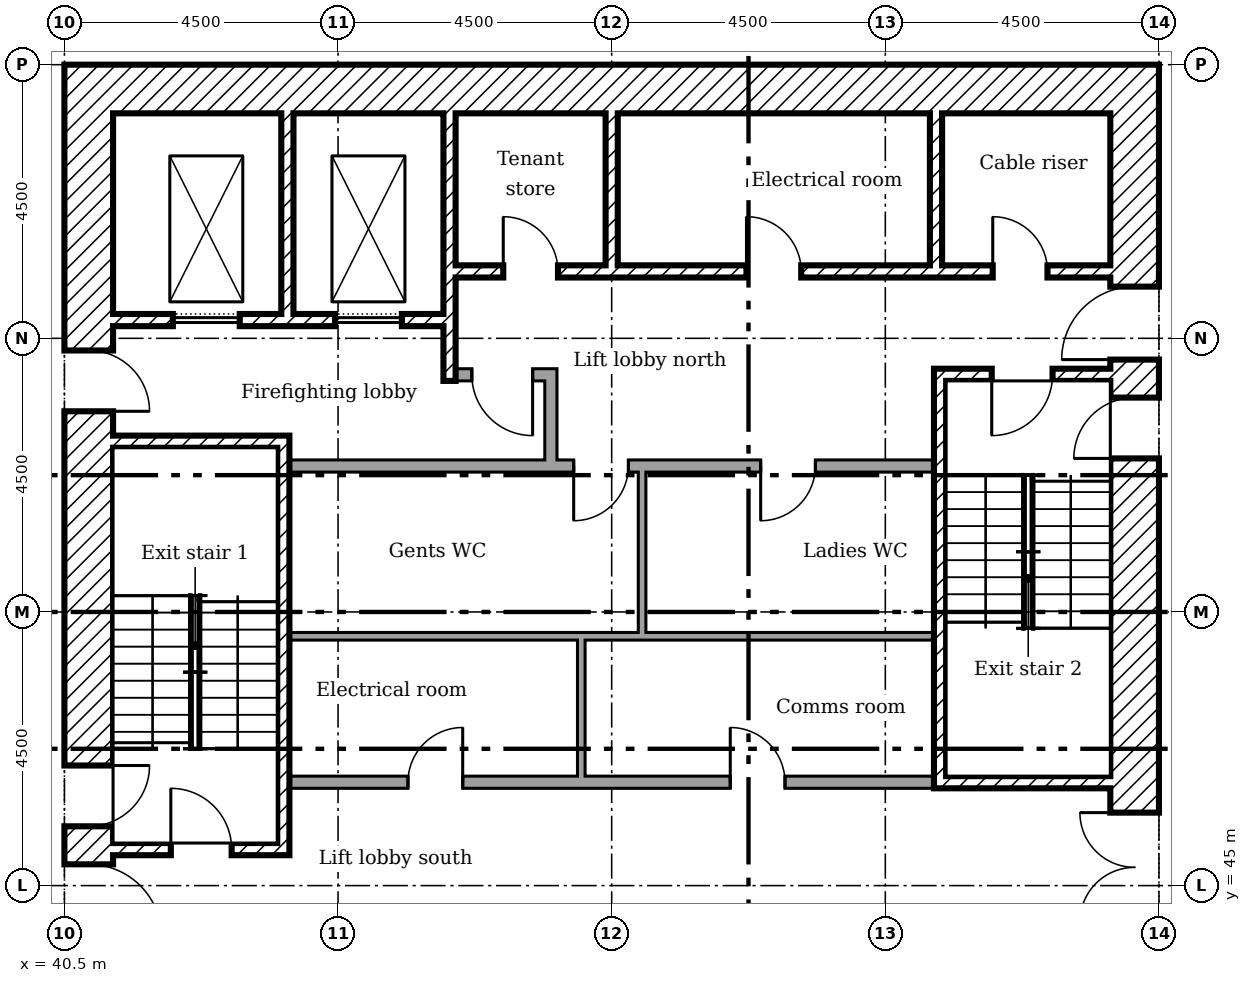
"""IFC4 building model, lengths in metres.
Left out: names, types, materials, properties, quantities, classifications, styles, units other than length and angle.
Written with IfcOpenShell. Run it as: python <this file> out.ifc"""

import sys

from ifc_helpers import new_model, si_unit, direction, frame, frame_2d, origin, place, context, subcontext, project, spatial, rectangle, extrude, element, fill, save


model = new_model("IFC4")
c1 = context("Model", 3, precision=1e-05, world=origin(), true_north=direction((0.0, 1.0)))
c2 = subcontext(c1, "Body", "Model", "MODEL_VIEW")
j1 = project(units=[si_unit("LENGTHUNIT", "METRE"), si_unit("PLANEANGLEUNIT", "RADIAN")], contexts=[c1])
p1 = place(None, origin())
s1 = spatial("IfcSite", under=j1, at=p1, CompositionType="ELEMENT")
p2 = place(p1, origin())
s2 = spatial("IfcBuilding", under=s1, at=p2, CompositionType="ELEMENT")
p3 = place(p2, frame((0.0, 0.0, 87.0)))
s3 = spatial("IfcBuildingStorey", under=s2, at=p3, CompositionType="ELEMENT", Elevation=87.0)
p4 = place(p3, frame((58.1, 40.5, 0.0), z_axis=(0.0, 0.0, 1.0), x_axis=(0.0, 1.0, 0.0)))
e1 = element("IfcWall", 1, at=p4, inside=s3, PredefinedType="SHEAR", context=c2, shape_type="SweptSolid", body=[
    extrude(rectangle(XDim=18.0, YDim=0.8, at=frame_2d((9.0, 0.0))), origin(), (0.0, 0.0, 1.0), 4.75),
])
p5 = place(p4, frame((13.15, 0.0, 0.0)))
e2 = element("IfcOpeningElement", 2, at=p5, cuts=e1, PredefinedType="OPENING", context=c2, shape_type="SweptSolid", body=[
    extrude(rectangle(XDim=1.2, YDim=2.1, at=frame_2d((0.6, 1.05))), frame((0.0, 0.41, 0.0), z_axis=(0.0, -1.0, 0.0), x_axis=(1.0, 0.0, 0.0)), (0.0, 0.0, 1.0), 0.82),
])
p6 = place(p4, frame((3.9, 0.0, 0.0)))
e3 = element("IfcOpeningElement", 3, at=p6, cuts=e1, PredefinedType="OPENING", context=c2, shape_type="SweptSolid", body=[
    extrude(rectangle(XDim=1.8, YDim=2.1, at=frame_2d((0.9, 1.05))), frame((0.0, 0.41, 0.0), z_axis=(0.0, -1.0, 0.0), x_axis=(1.0, 0.0, 0.0)), (0.0, 0.0, 1.0), 0.82),
])
p7 = place(p4, frame((11.525, 0.0, 0.0)))
e4 = element("IfcOpeningElement", 4, at=p7, cuts=e1, PredefinedType="OPENING", context=c2, shape_type="SweptSolid", body=[
    extrude(rectangle(XDim=1.0, YDim=2.1, at=frame_2d((0.5, 1.05))), frame((0.0, 0.41, 0.0), z_axis=(0.0, -1.0, 0.0), x_axis=(1.0, 0.0, 0.0)), (0.0, 0.0, 1.0), 0.82),
])
p8 = place(p3, frame((41.3, 58.1, 0.0)))
e5 = element("IfcWall", 5, at=p8, inside=s3, PredefinedType="SHEAR", context=c2, shape_type="SweptSolid", body=[
    extrude(rectangle(XDim=16.4, YDim=0.8, at=frame_2d((8.2, 0.0))), origin(), (0.0, 0.0, 1.0), 4.75),
])
p9 = place(p3, frame((40.9, 40.5, 0.0), z_axis=(0.0, 0.0, 1.0), x_axis=(0.0, 1.0, 0.0)))
e6 = element("IfcWall", 6, at=p9, inside=s3, PredefinedType="SHEAR", context=c2, shape_type="SweptSolid", body=[
    extrude(rectangle(XDim=18.0, YDim=0.8, at=frame_2d((9.0, 0.0))), origin(), (0.0, 0.0, 1.0), 4.75),
])
p10 = place(p9, frame((3.65, 0.0, 0.0)))
e7 = element("IfcOpeningElement", 7, at=p10, cuts=e6, PredefinedType="OPENING", context=c2, shape_type="SweptSolid", body=[
    extrude(rectangle(XDim=1.2, YDim=2.1, at=frame_2d((0.6, 1.05))), frame((0.0, 0.41, 0.0), z_axis=(0.0, -1.0, 0.0), x_axis=(1.0, 0.0, 0.0)), (0.0, 0.0, 1.0), 0.82),
])
p11 = place(p9, frame((5.475, 0.0, 0.0)))
e8 = element("IfcOpeningElement", 8, at=p11, cuts=e6, PredefinedType="OPENING", context=c2, shape_type="SweptSolid", body=[
    extrude(rectangle(XDim=1.0, YDim=2.1, at=frame_2d((0.5, 1.05))), frame((0.0, 0.41, 0.0), z_axis=(0.0, -1.0, 0.0), x_axis=(1.0, 0.0, 0.0)), (0.0, 0.0, 1.0), 0.82),
])
p12 = place(p9, frame((12.3, 0.0, 0.0)))
e9 = element("IfcOpeningElement", 9, at=p12, cuts=e6, PredefinedType="OPENING", context=c2, shape_type="SweptSolid", body=[
    extrude(rectangle(XDim=1.0, YDim=2.1, at=frame_2d((0.5, 1.05))), frame((0.0, 0.41, 0.0), z_axis=(0.0, -1.0, 0.0), x_axis=(1.0, 0.0, 0.0)), (0.0, 0.0, 1.0), 0.82),
])
p13 = place(p3, frame((44.167, 57.7, 0.0), z_axis=(0.0, 0.0, 1.0), x_axis=(0.0, -1.0, 0.0)))
e10 = element("IfcWall", 10, at=p13, inside=s3, PredefinedType="SHEAR", context=c2, shape_type="SweptSolid", body=[
    extrude(rectangle(XDim=3.3, YDim=0.2, at=frame_2d((1.65, 0.0))), origin(), (0.0, 0.0, 1.0), 4.75),
])
p14 = place(p3, frame((46.833, 57.7, 0.0), z_axis=(0.0, 0.0, 1.0), x_axis=(0.0, -1.0, 0.0)))
e11 = element("IfcWall", 11, at=p14, inside=s3, PredefinedType="SHEAR", context=c2, shape_type="SweptSolid", body=[
    extrude(rectangle(XDim=4.4, YDim=0.2, at=frame_2d((2.2, 0.0))), origin(), (0.0, 0.0, 1.0), 4.75),
])
for number, where, z_axis, x_axis in (
    (12, (49.5, 57.7, 0.0), (0.0, 0.0, 1.0), (0.0, -1.0, 0.0)),
    (13, (54.833, 57.7, 0.0), (0.0, 0.0, 1.0), (0.0, -1.0, 0.0)),
):
    element("IfcWall", number, at=place(p3, frame(where, z_axis=z_axis, x_axis=x_axis)), inside=s3, PredefinedType="SHEAR", context=c2, shape_type="SweptSolid", body=[
        extrude(rectangle(XDim=2.5, YDim=0.2, at=frame_2d((1.25, 0.0))), origin(), (0.0, 0.0, 1.0), 4.75),
    ])
p15 = place(p3, frame((48.5, 51.9, 0.0), z_axis=(0.0, 0.0, 1.0), x_axis=(0.0, 1.0, 0.0)))
e14 = element("IfcWall", 14, at=p15, inside=s3, PredefinedType="PARTITIONING", context=c2, shape_type="SweptSolid", body=[
    extrude(rectangle(XDim=1.6, YDim=0.2, at=frame_2d((0.8, 0.0))), origin(), (0.0, 0.0, 1.0), 4.75),
])
p16 = place(p3, frame((46.933, 53.4, 0.0)))
e15 = element("IfcWall", 15, at=p16, inside=s3, PredefinedType="PARTITIONING", context=c2, shape_type="SweptSolid", body=[
    extrude(rectangle(XDim=1.467, YDim=0.2, at=frame_2d((0.733, 0.0))), origin(), (0.0, 0.0, 1.0), 4.75),
])
p17 = place(p16, frame((0.267, 0.0, 0.0)))
e16 = element("IfcOpeningElement", 16, at=p17, cuts=e15, PredefinedType="OPENING", context=c2, shape_type="SweptSolid", body=[
    extrude(rectangle(XDim=1.0, YDim=2.1, at=frame_2d((0.5, 1.05))), frame((0.0, 0.11, 0.0), z_axis=(0.0, -1.0, 0.0), x_axis=(1.0, 0.0, 0.0)), (0.0, 0.0, 1.0), 0.22),
])
p18 = place(p3, frame((46.933, 55.1, 0.0)))
e17 = element("IfcWall", 17, at=p18, inside=s3, PredefinedType="SHEAR", context=c2, shape_type="SweptSolid", body=[
    extrude(rectangle(XDim=10.767, YDim=0.2, at=frame_2d((5.383, 0.0))), origin(), (0.0, 0.0, 1.0), 4.75),
])
p19 = place(p18, frame((8.833, 0.0, 0.0)))
e18 = element("IfcOpeningElement", 18, at=p19, cuts=e17, PredefinedType="OPENING", context=c2, shape_type="SweptSolid", body=[
    extrude(rectangle(XDim=0.9, YDim=2.1, at=frame_2d((0.45, 1.05))), frame((0.0, 0.11, 0.0), z_axis=(0.0, -1.0, 0.0), x_axis=(1.0, 0.0, 0.0)), (0.0, 0.0, 1.0), 0.22),
])
p20 = place(p18, frame((0.783, 0.0, 0.0)))
e19 = element("IfcOpeningElement", 19, at=p20, cuts=e17, PredefinedType="OPENING", context=c2, shape_type="SweptSolid", body=[
    extrude(rectangle(XDim=0.9, YDim=2.1, at=frame_2d((0.45, 1.05))), frame((0.0, 0.11, 0.0), z_axis=(0.0, -1.0, 0.0), x_axis=(1.0, 0.0, 0.0)), (0.0, 0.0, 1.0), 0.22),
])
p21 = place(p18, frame((4.783, 0.0, 0.0)))
e20 = element("IfcOpeningElement", 20, at=p21, cuts=e17, PredefinedType="OPENING", context=c2, shape_type="SweptSolid", body=[
    extrude(rectangle(XDim=0.9, YDim=2.1, at=frame_2d((0.45, 1.05))), frame((0.0, 0.11, 0.0), z_axis=(0.0, -1.0, 0.0), x_axis=(1.0, 0.0, 0.0)), (0.0, 0.0, 1.0), 0.22),
])
p22 = place(p3, frame((41.3, 54.3, 0.0)))
e21 = element("IfcWall", 21, at=p22, inside=s3, PredefinedType="SHEAR", context=c2, shape_type="SweptSolid", body=[
    extrude(rectangle(XDim=5.433, YDim=0.2, at=frame_2d((2.717, 0.0))), origin(), (0.0, 0.0, 1.0), 4.75),
])
p23 = place(p22, frame((0.983, 0.0, 0.0)))
e22 = element("IfcOpeningElement", 22, at=p23, cuts=e21, PredefinedType="OPENING", context=c2, shape_type="SweptSolid", body=[
    extrude(rectangle(XDim=1.1, YDim=2.1, at=frame_2d((0.55, 1.05))), frame((0.0, 0.11, 0.0), z_axis=(0.0, -1.0, 0.0), x_axis=(1.0, 0.0, 0.0)), (0.0, 0.0, 1.0), 0.22),
])
p24 = place(p22, frame((3.65, 0.0, 0.0)))
e23 = element("IfcOpeningElement", 23, at=p24, cuts=e21, PredefinedType="OPENING", context=c2, shape_type="SweptSolid", body=[
    extrude(rectangle(XDim=1.1, YDim=2.1, at=frame_2d((0.55, 1.05))), frame((0.0, 0.11, 0.0), z_axis=(0.0, -1.0, 0.0), x_axis=(1.0, 0.0, 0.0)), (0.0, 0.0, 1.0), 0.22),
])
p25 = place(p3, frame((44.1, 45.5, 0.0), z_axis=(0.0, 0.0, 1.0), x_axis=(0.0, 1.0, 0.0)))
e24 = element("IfcWall", 24, at=p25, inside=s3, PredefinedType="SHEAR", context=c2, shape_type="SweptSolid", body=[
    extrude(rectangle(XDim=6.9, YDim=0.2, at=frame_2d((3.45, 0.0))), origin(), (0.0, 0.0, 1.0), 4.75),
])
p26 = place(p3, frame((41.3, 52.3, 0.0)))
e25 = element("IfcWall", 25, at=p26, inside=s3, PredefinedType="SHEAR", context=c2, shape_type="SweptSolid", body=[
    extrude(rectangle(XDim=2.7, YDim=0.2, at=frame_2d((1.35, 0.0))), origin(), (0.0, 0.0, 1.0), 4.75),
])
p27 = place(p3, frame((41.3, 45.6, 0.0)))
e26 = element("IfcWall", 26, at=p27, inside=s3, PredefinedType="SHEAR", context=c2, shape_type="SweptSolid", body=[
    extrude(rectangle(XDim=2.7, YDim=0.2, at=frame_2d((1.35, 0.0))), origin(), (0.0, 0.0, 1.0), 4.75),
])
p28 = place(p27, frame((0.95, 0.0, 0.0)))
e27 = element("IfcOpeningElement", 27, at=p28, cuts=e26, PredefinedType="OPENING", context=c2, shape_type="SweptSolid", body=[
    extrude(rectangle(XDim=1.0, YDim=2.1, at=frame_2d((0.5, 1.05))), frame((0.0, 0.11, 0.0), z_axis=(0.0, -1.0, 0.0), x_axis=(1.0, 0.0, 0.0)), (0.0, 0.0, 1.0), 0.22),
])
p29 = place(p3, frame((54.8, 53.4, 0.0)))
e28 = element("IfcWall", 28, at=p29, inside=s3, PredefinedType="SHEAR", context=c2, shape_type="SweptSolid", body=[
    extrude(rectangle(XDim=2.9, YDim=0.2, at=frame_2d((1.45, 0.0))), origin(), (0.0, 0.0, 1.0), 4.75),
])
p30 = place(p29, frame((0.95, 0.0, 0.0)))
e29 = element("IfcOpeningElement", 29, at=p30, cuts=e28, PredefinedType="OPENING", context=c2, shape_type="SweptSolid", body=[
    extrude(rectangle(XDim=1.0, YDim=2.1, at=frame_2d((0.5, 1.05))), frame((0.0, 0.11, 0.0), z_axis=(0.0, -1.0, 0.0), x_axis=(1.0, 0.0, 0.0)), (0.0, 0.0, 1.0), 0.22),
])
p31 = place(p3, frame((54.8, 46.7, 0.0)))
e30 = element("IfcWall", 30, at=p31, inside=s3, PredefinedType="SHEAR", context=c2, shape_type="SweptSolid", body=[
    extrude(rectangle(XDim=2.9, YDim=0.2, at=frame_2d((1.45, 0.0))), origin(), (0.0, 0.0, 1.0), 4.75),
])
p32 = place(p3, frame((54.9, 46.8, 0.0), z_axis=(0.0, 0.0, 1.0), x_axis=(0.0, 1.0, 0.0)))
e31 = element("IfcWall", 31, at=p32, inside=s3, PredefinedType="SHEAR", context=c2, shape_type="SweptSolid", body=[
    extrude(rectangle(XDim=6.5, YDim=0.2, at=frame_2d((3.25, 0.0))), origin(), (0.0, 0.0, 1.0), 4.75),
])
p33 = place(p3, frame((44.2, 51.9, 0.0)))
e32 = element("IfcWall", 32, at=p33, inside=s3, PredefinedType="PARTITIONING", context=c2, shape_type="SweptSolid", body=[
    extrude(rectangle(XDim=10.6, YDim=0.2, at=frame_2d((5.3, 0.0))), origin(), (0.0, 0.0, 1.0), 4.75),
])
p34 = place(p33, frame((4.675, 0.0, 0.0)))
e33 = element("IfcOpeningElement", 33, at=p34, cuts=e32, PredefinedType="OPENING", context=c2, shape_type="SweptSolid", body=[
    extrude(rectangle(XDim=0.9, YDim=2.1, at=frame_2d((0.45, 1.05))), frame((0.0, 0.11, 0.0), z_axis=(0.0, -1.0, 0.0), x_axis=(1.0, 0.0, 0.0)), (0.0, 0.0, 1.0), 0.22),
])
p35 = place(p33, frame((7.75, 0.0, 0.0)))
e34 = element("IfcOpeningElement", 34, at=p35, cuts=e32, PredefinedType="OPENING", context=c2, shape_type="SweptSolid", body=[
    extrude(rectangle(XDim=0.9, YDim=2.1, at=frame_2d((0.45, 1.05))), frame((0.0, 0.11, 0.0), z_axis=(0.0, -1.0, 0.0), x_axis=(1.0, 0.0, 0.0)), (0.0, 0.0, 1.0), 0.22),
])
p36 = place(p3, frame((44.2, 46.7, 0.0)))
e35 = element("IfcWall", 35, at=p36, inside=s3, PredefinedType="PARTITIONING", context=c2, shape_type="SweptSolid", body=[
    extrude(rectangle(XDim=10.6, YDim=0.2, at=frame_2d((5.3, 0.0))), origin(), (0.0, 0.0, 1.0), 4.75),
])
p37 = place(p36, frame((1.95, 0.0, 0.0)))
e36 = element("IfcOpeningElement", 36, at=p37, cuts=e35, PredefinedType="OPENING", context=c2, shape_type="SweptSolid", body=[
    extrude(rectangle(XDim=0.9, YDim=2.1, at=frame_2d((0.45, 1.05))), frame((0.0, 0.11, 0.0), z_axis=(0.0, -1.0, 0.0), x_axis=(1.0, 0.0, 0.0)), (0.0, 0.0, 1.0), 0.22),
])
p38 = place(p36, frame((7.25, 0.0, 0.0)))
e37 = element("IfcOpeningElement", 37, at=p38, cuts=e35, PredefinedType="OPENING", context=c2, shape_type="SweptSolid", body=[
    extrude(rectangle(XDim=0.9, YDim=2.1, at=frame_2d((0.45, 1.05))), frame((0.0, 0.11, 0.0), z_axis=(0.0, -1.0, 0.0), x_axis=(1.0, 0.0, 0.0)), (0.0, 0.0, 1.0), 0.22),
])
p39 = place(p3, frame((49.0, 46.8, 0.0), z_axis=(0.0, 0.0, 1.0), x_axis=(0.0, 1.0, 0.0)))
e38 = element("IfcWall", 38, at=p39, inside=s3, PredefinedType="PARTITIONING", context=c2, shape_type="SweptSolid", body=[
    extrude(rectangle(XDim=2.363, YDim=0.125, at=frame_2d((1.181, 0.0))), origin(), (0.0, 0.0, 1.0), 4.75),
])
p40 = place(p3, frame((49.0, 49.1, 0.0), z_axis=(0.0, 0.0, 1.0), x_axis=(-1.0, 0.0, 0.0)))
e39 = element("IfcWall", 39, at=p40, inside=s3, PredefinedType="PARTITIONING", context=c2, shape_type="SweptSolid", body=[
    extrude(rectangle(XDim=4.8, YDim=0.125, at=frame_2d((2.4, 0.0))), origin(), (0.0, 0.0, 1.0), 4.75),
])
p41 = place(p3, frame((50.062, 49.1, 0.0), z_axis=(0.0, 0.0, 1.0), x_axis=(-1.0, 0.0, 0.0)))
e40 = element("IfcWall", 40, at=p41, inside=s3, PredefinedType="PARTITIONING", context=c2, shape_type="SweptSolid", body=[
    extrude(rectangle(XDim=1.0, YDim=0.125, at=frame_2d((0.5, 0.0))), origin(), (0.0, 0.0, 1.0), 4.75),
])
p42 = place(p3, frame((54.8, 49.1, 0.0), z_axis=(0.0, 0.0, 1.0), x_axis=(-1.0, 0.0, 0.0)))
e41 = element("IfcWall", 41, at=p42, inside=s3, PredefinedType="PARTITIONING", context=c2, shape_type="SweptSolid", body=[
    extrude(rectangle(XDim=4.8, YDim=0.125, at=frame_2d((2.4, 0.0))), origin(), (0.0, 0.0, 1.0), 4.75),
])
p43 = place(p3, frame((50.0, 49.163, 0.0), z_axis=(0.0, 0.0, 1.0), x_axis=(0.0, 1.0, 0.0)))
e42 = element("IfcWall", 42, at=p43, inside=s3, PredefinedType="PARTITIONING", context=c2, shape_type="SweptSolid", body=[
    extrude(rectangle(XDim=2.637, YDim=0.125, at=frame_2d((1.319, 0.0))), origin(), (0.0, 0.0, 1.0), 4.75),
])
p44 = place(p5, origin())
e43 = element("IfcDoor", 43, at=p44, inside=s3, OperationType="SINGLE_SWING_RIGHT", PredefinedType="DOOR", context=c2, shape_type="SweptSolid", body=[
    extrude(rectangle(XDim=1.2, YDim=2.1, at=frame_2d((0.6, 1.05))), frame((0.0, 0.025, 0.0), z_axis=(0.0, -1.0, 0.0), x_axis=(1.0, 0.0, 0.0)), (0.0, 0.0, 1.0), 0.05),
])
fill(e2, e43)
p45 = place(p6, origin())
e44 = element("IfcDoor", 44, at=p45, inside=s3, OperationType="DOUBLE_DOOR_SINGLE_SWING", PredefinedType="DOOR", context=c2, shape_type="SweptSolid", body=[
    extrude(rectangle(XDim=1.8, YDim=2.1, at=frame_2d((0.9, 1.05))), frame((0.0, 0.025, 0.0), z_axis=(0.0, -1.0, 0.0), x_axis=(1.0, 0.0, 0.0)), (0.0, 0.0, 1.0), 0.05),
])
fill(e3, e44)
p46 = place(p10, frame((1.2, 0.0, 0.0), x_axis=(-1.0, 0.0, 0.0)))
e45 = element("IfcDoor", 45, at=p46, inside=s3, OperationType="SINGLE_SWING_LEFT", PredefinedType="DOOR", context=c2, shape_type="SweptSolid", body=[
    extrude(rectangle(XDim=1.2, YDim=2.1, at=frame_2d((0.6, 1.05))), frame((0.0, 0.025, 0.0), z_axis=(0.0, -1.0, 0.0), x_axis=(1.0, 0.0, 0.0)), (0.0, 0.0, 1.0), 0.05),
])
fill(e7, e45)
p47 = place(p28, origin())
e46 = element("IfcDoor", 46, at=p47, inside=s3, OperationType="SINGLE_SWING_RIGHT", PredefinedType="DOOR", context=c2, shape_type="SweptSolid", body=[
    extrude(rectangle(XDim=1.0, YDim=2.1, at=frame_2d((0.5, 1.05))), frame((0.0, 0.025, 0.0), z_axis=(0.0, -1.0, 0.0), x_axis=(1.0, 0.0, 0.0)), (0.0, 0.0, 1.0), 0.05),
])
fill(e27, e46)
p48 = place(p11, frame((1.0, 0.0, 0.0), x_axis=(-1.0, 0.0, 0.0)))
e47 = element("IfcDoor", 47, at=p48, inside=s3, OperationType="SINGLE_SWING_RIGHT", PredefinedType="DOOR", context=c2, shape_type="SweptSolid", body=[
    extrude(rectangle(XDim=1.0, YDim=2.1, at=frame_2d((0.5, 1.05))), frame((0.0, 0.025, 0.0), z_axis=(0.0, -1.0, 0.0), x_axis=(1.0, 0.0, 0.0)), (0.0, 0.0, 1.0), 0.05),
])
fill(e8, e47)
p49 = place(p30, frame((1.0, 0.0, 0.0), x_axis=(-1.0, 0.0, 0.0)))
e48 = element("IfcDoor", 48, at=p49, inside=s3, OperationType="SINGLE_SWING_LEFT", PredefinedType="DOOR", context=c2, shape_type="SweptSolid", body=[
    extrude(rectangle(XDim=1.0, YDim=2.1, at=frame_2d((0.5, 1.05))), frame((0.0, 0.025, 0.0), z_axis=(0.0, -1.0, 0.0), x_axis=(1.0, 0.0, 0.0)), (0.0, 0.0, 1.0), 0.05),
])
fill(e29, e48)
p50 = place(p7, origin())
e49 = element("IfcDoor", 49, at=p50, inside=s3, OperationType="SINGLE_SWING_RIGHT", PredefinedType="DOOR", context=c2, shape_type="SweptSolid", body=[
    extrude(rectangle(XDim=1.0, YDim=2.1, at=frame_2d((0.5, 1.05))), frame((0.0, 0.025, 0.0), z_axis=(0.0, -1.0, 0.0), x_axis=(1.0, 0.0, 0.0)), (0.0, 0.0, 1.0), 0.05),
])
fill(e4, e49)
p51 = place(p17, frame((1.0, 0.0, 0.0), x_axis=(-1.0, 0.0, 0.0)))
e50 = element("IfcDoor", 50, at=p51, inside=s3, OperationType="SINGLE_SWING_RIGHT", PredefinedType="DOOR", context=c2, shape_type="SweptSolid", body=[
    extrude(rectangle(XDim=1.0, YDim=2.1, at=frame_2d((0.5, 1.05))), frame((0.0, 0.025, 0.0), z_axis=(0.0, -1.0, 0.0), x_axis=(1.0, 0.0, 0.0)), (0.0, 0.0, 1.0), 0.05),
])
fill(e16, e50)
p52 = place(p12, frame((1.0, 0.0, 0.0), x_axis=(-1.0, 0.0, 0.0)))
e51 = element("IfcDoor", 51, at=p52, inside=s3, OperationType="SINGLE_SWING_LEFT", PredefinedType="DOOR", context=c2, shape_type="SweptSolid", body=[
    extrude(rectangle(XDim=1.0, YDim=2.1, at=frame_2d((0.5, 1.05))), frame((0.0, 0.025, 0.0), z_axis=(0.0, -1.0, 0.0), x_axis=(1.0, 0.0, 0.0)), (0.0, 0.0, 1.0), 0.05),
])
fill(e9, e51)
p53 = place(p19, origin())
e52 = element("IfcDoor", 52, at=p53, inside=s3, OperationType="SINGLE_SWING_RIGHT", PredefinedType="DOOR", context=c2, shape_type="SweptSolid", body=[
    extrude(rectangle(XDim=0.9, YDim=2.1, at=frame_2d((0.45, 1.05))), frame((0.0, 0.025, 0.0), z_axis=(0.0, -1.0, 0.0), x_axis=(1.0, 0.0, 0.0)), (0.0, 0.0, 1.0), 0.05),
])
fill(e18, e52)
p54 = place(p20, origin())
e53 = element("IfcDoor", 53, at=p54, inside=s3, OperationType="SINGLE_SWING_RIGHT", PredefinedType="DOOR", context=c2, shape_type="SweptSolid", body=[
    extrude(rectangle(XDim=0.9, YDim=2.1, at=frame_2d((0.45, 1.05))), frame((0.0, 0.025, 0.0), z_axis=(0.0, -1.0, 0.0), x_axis=(1.0, 0.0, 0.0)), (0.0, 0.0, 1.0), 0.05),
])
fill(e19, e53)
p55 = place(p21, origin())
e54 = element("IfcDoor", 54, at=p55, inside=s3, OperationType="SINGLE_SWING_RIGHT", PredefinedType="DOOR", context=c2, shape_type="SweptSolid", body=[
    extrude(rectangle(XDim=0.9, YDim=2.1, at=frame_2d((0.45, 1.05))), frame((0.0, 0.025, 0.0), z_axis=(0.0, -1.0, 0.0), x_axis=(1.0, 0.0, 0.0)), (0.0, 0.0, 1.0), 0.05),
])
fill(e20, e54)
p56 = place(p37, origin())
e55 = element("IfcDoor", 55, at=p56, inside=s3, OperationType="SINGLE_SWING_LEFT", PredefinedType="DOOR", context=c2, shape_type="SweptSolid", body=[
    extrude(rectangle(XDim=0.9, YDim=2.1, at=frame_2d((0.45, 1.05))), frame((0.0, 0.025, 0.0), z_axis=(0.0, -1.0, 0.0), x_axis=(1.0, 0.0, 0.0)), (0.0, 0.0, 1.0), 0.05),
])
fill(e36, e55)
p57 = place(p38, origin())
e56 = element("IfcDoor", 56, at=p57, inside=s3, OperationType="SINGLE_SWING_RIGHT", PredefinedType="DOOR", context=c2, shape_type="SweptSolid", body=[
    extrude(rectangle(XDim=0.9, YDim=2.1, at=frame_2d((0.45, 1.05))), frame((0.0, 0.025, 0.0), z_axis=(0.0, -1.0, 0.0), x_axis=(1.0, 0.0, 0.0)), (0.0, 0.0, 1.0), 0.05),
])
fill(e37, e56)
p58 = place(p34, frame((0.9, 0.0, 0.0), x_axis=(-1.0, 0.0, 0.0)))
e57 = element("IfcDoor", 57, at=p58, inside=s3, OperationType="SINGLE_SWING_LEFT", PredefinedType="DOOR", context=c2, shape_type="SweptSolid", body=[
    extrude(rectangle(XDim=0.9, YDim=2.1, at=frame_2d((0.45, 1.05))), frame((0.0, 0.025, 0.0), z_axis=(0.0, -1.0, 0.0), x_axis=(1.0, 0.0, 0.0)), (0.0, 0.0, 1.0), 0.05),
])
fill(e33, e57)
p59 = place(p35, frame((0.9, 0.0, 0.0), x_axis=(-1.0, 0.0, 0.0)))
e58 = element("IfcDoor", 58, at=p59, inside=s3, OperationType="SINGLE_SWING_LEFT", PredefinedType="DOOR", context=c2, shape_type="SweptSolid", body=[
    extrude(rectangle(XDim=0.9, YDim=2.1, at=frame_2d((0.45, 1.05))), frame((0.0, 0.025, 0.0), z_axis=(0.0, -1.0, 0.0), x_axis=(1.0, 0.0, 0.0)), (0.0, 0.0, 1.0), 0.05),
])
fill(e34, e58)
p60 = place(p23, origin())
e59 = element("IfcDoor", 59, at=p60, inside=s3, OperationType="SLIDING_TO_LEFT", PredefinedType="DOOR", context=c2, shape_type="SweptSolid", body=[
    extrude(rectangle(XDim=1.1, YDim=2.1, at=frame_2d((0.55, 1.05))), frame((0.0, 0.025, 0.0), z_axis=(0.0, -1.0, 0.0), x_axis=(1.0, 0.0, 0.0)), (0.0, 0.0, 1.0), 0.05),
])
fill(e22, e59)
p61 = place(p24, origin())
e60 = element("IfcDoor", 60, at=p61, inside=s3, OperationType="SLIDING_TO_LEFT", PredefinedType="DOOR", context=c2, shape_type="SweptSolid", body=[
    extrude(rectangle(XDim=1.1, YDim=2.1, at=frame_2d((0.55, 1.05))), frame((0.0, 0.025, 0.0), z_axis=(0.0, -1.0, 0.0), x_axis=(1.0, 0.0, 0.0)), (0.0, 0.0, 1.0), 0.05),
])
fill(e23, e60)
save(model, sys.argv[1])
